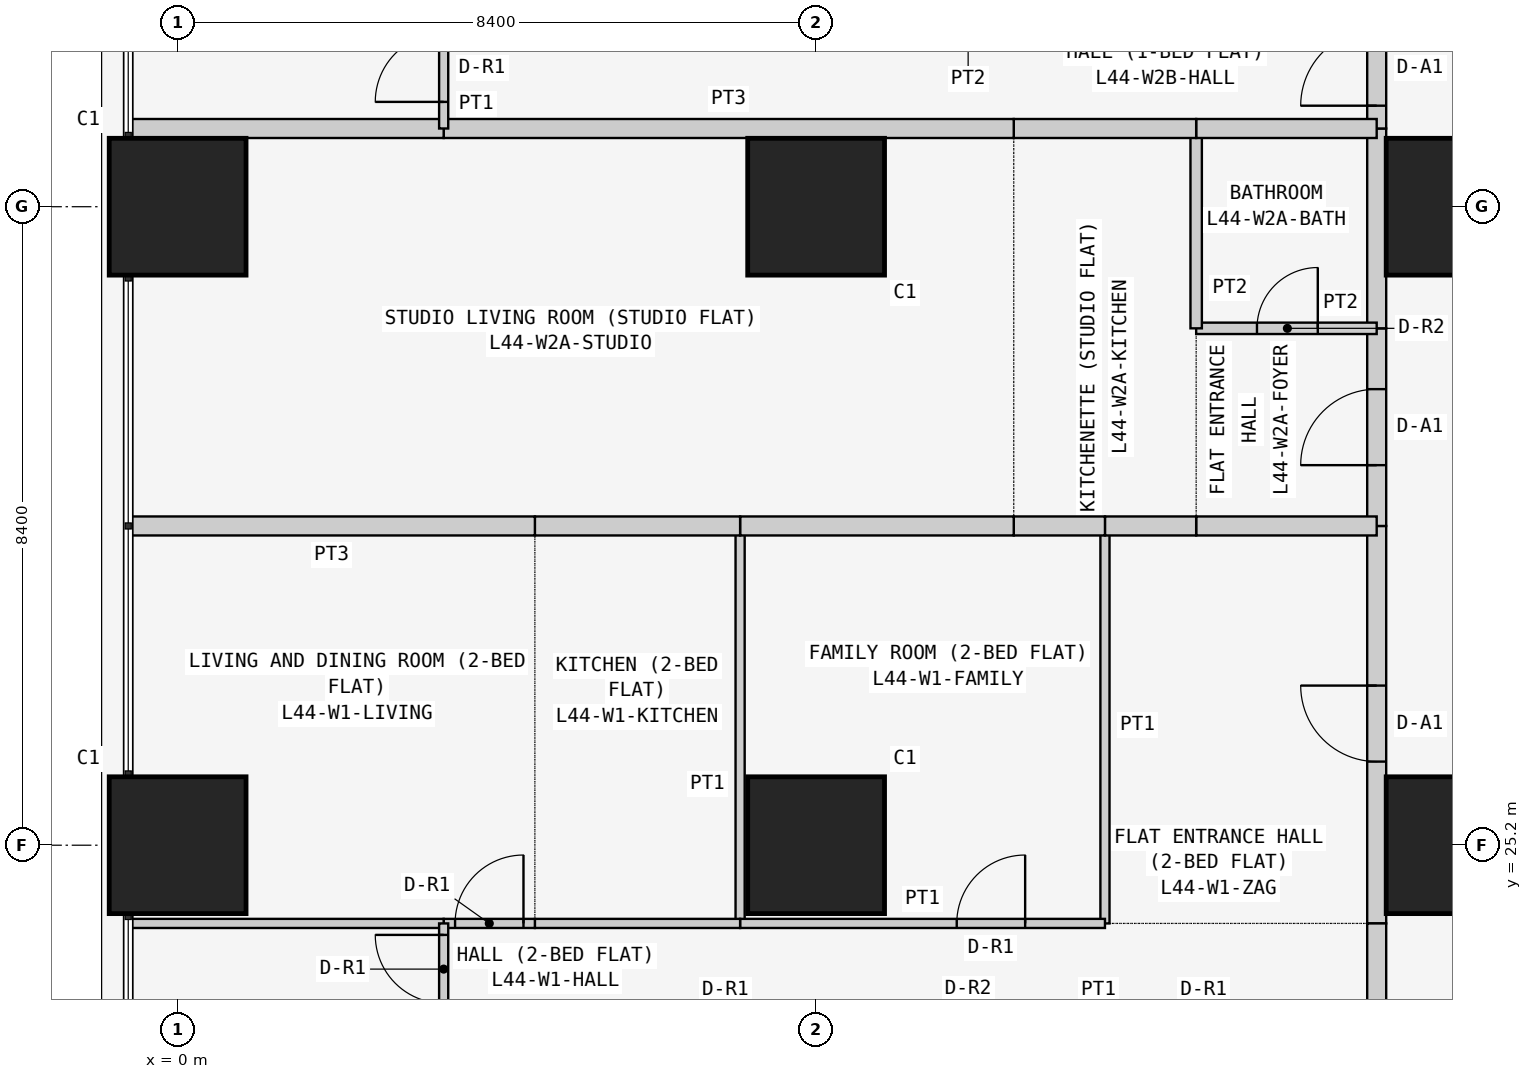
"""IFC4 building model, lengths in metres.
Left out: names, types, materials, properties, quantities, classifications, styles, units other than length and angle.
Written with IfcOpenShell. Run it as: python <this file> out.ifc"""

import sys

from ifc_helpers import new_model, si_unit, direction, frame, frame_2d, origin, origin_2d, place, context, subcontext, project, spatial, rectangle, extrude, element, fill, save


model = new_model("IFC4")
c1 = context("Model", 3, precision=1e-05, world=origin(), true_north=direction((0.0, 1.0)))
c2 = subcontext(c1, "Body", "Model", "MODEL_VIEW")
j1 = project(units=[si_unit("LENGTHUNIT", "METRE"), si_unit("PLANEANGLEUNIT", "RADIAN")], contexts=[c1])
p1 = place(None, origin())
s1 = spatial("IfcSite", under=j1, at=p1, CompositionType="ELEMENT")
p2 = place(p1, origin())
s2 = spatial("IfcBuilding", under=s1, at=p2, CompositionType="ELEMENT")
p3 = place(p2, frame((0.0, 0.0, 170.1)))
s3 = spatial("IfcBuildingStorey", under=s2, at=p3, CompositionType="ELEMENT", Elevation=170.1)
for number, where, z_axis, x_axis in (
    (1, (0.0, 25.2, 0.0), (0.0, 0.0, 1.0), (1.0, 0.0, 0.0)),
    (2, (0.0, 33.6, 0.0), (0.0, 0.0, 1.0), (1.0, 0.0, 0.0)),
    (3, (8.4, 25.2, 0.0), (0.0, 0.0, 1.0), (1.0, 0.0, 0.0)),
    (4, (8.4, 33.6, 0.0), (0.0, 0.0, 1.0), (1.0, 0.0, 0.0)),
    (5, (16.8, 25.2, 0.0), (0.0, 0.0, 1.0), (1.0, 0.0, 0.0)),
    (6, (16.8, 33.6, 0.0), (0.0, 0.0, 1.0), (1.0, 0.0, 0.0)),
):
    element("IfcColumn", number, at=place(p3, frame(where, z_axis=z_axis, x_axis=x_axis)), inside=s3, PredefinedType="COLUMN", context=c2, shape_type="SweptSolid", body=[
        extrude(rectangle(XDim=1.8, YDim=1.8, at=origin_2d()), origin(), (0.0, 0.0, 1.0), 3.6),
    ])
p4 = place(p3, frame((15.775, 24.171, 0.0), z_axis=(0.0, 0.0, 1.0), x_axis=(0.0, 1.0, 0.0)))
e7 = element("IfcWall", 7, at=p4, inside=s3, PredefinedType="PARTITIONING", context=c2, shape_type="SweptSolid", body=[
    extrude(rectangle(XDim=5.229, YDim=0.25, at=frame_2d((2.615, 0.0))), origin(), (0.0, 0.0, 1.0), 3.45),
])
p5 = place(p4, frame((2.129, 0.0, 0.0)))
e8 = element("IfcOpeningElement", 8, at=p5, cuts=e7, PredefinedType="OPENING", context=c2, shape_type="SweptSolid", body=[
    extrude(rectangle(XDim=1.0, YDim=2.1, at=frame_2d((0.5, 1.05))), frame((0.0, 0.135, 0.0), z_axis=(0.0, -1.0, 0.0), x_axis=(1.0, 0.0, 0.0)), (0.0, 0.0, 1.0), 0.27),
])
p6 = place(p3, frame((15.775, 22.971, 0.0), z_axis=(0.0, 0.0, 1.0), x_axis=(0.0, 1.0, 0.0)))
e9 = element("IfcWall", 9, at=p6, inside=s3, PredefinedType="PARTITIONING", context=c2, shape_type="SweptSolid", body=[
    extrude(rectangle(XDim=1.2, YDim=0.25, at=frame_2d((0.6, 0.0))), origin(), (0.0, 0.0, 1.0), 3.45),
])
p7 = place(p3, frame((15.775, 29.4, 0.0), z_axis=(0.0, 0.0, 1.0), x_axis=(0.0, 1.0, 0.0)))
e10 = element("IfcWall", 10, at=p7, inside=s3, PredefinedType="PARTITIONING", context=c2, shape_type="SweptSolid", body=[
    extrude(rectangle(XDim=2.6, YDim=0.25, at=frame_2d((1.3, 0.0))), origin(), (0.0, 0.0, 1.0), 3.45),
])
p8 = place(p7, frame((0.8, 0.0, 0.0)))
e11 = element("IfcOpeningElement", 11, at=p8, cuts=e10, PredefinedType="OPENING", context=c2, shape_type="SweptSolid", body=[
    extrude(rectangle(XDim=1.0, YDim=2.1, at=frame_2d((0.5, 1.05))), frame((0.0, 0.135, 0.0), z_axis=(0.0, -1.0, 0.0), x_axis=(1.0, 0.0, 0.0)), (0.0, 0.0, 1.0), 0.27),
])
p9 = place(p3, frame((15.775, 32.0, 0.0), z_axis=(0.0, 0.0, 1.0), x_axis=(0.0, 1.0, 0.0)))
e12 = element("IfcWall", 12, at=p9, inside=s3, PredefinedType="PARTITIONING", context=c2, shape_type="SweptSolid", body=[
    extrude(rectangle(XDim=2.629, YDim=0.25, at=frame_2d((1.314, 0.0))), origin(), (0.0, 0.0, 1.0), 3.45),
])
p10 = place(p3, frame((15.775, 34.629, 0.0), z_axis=(0.0, 0.0, 1.0), x_axis=(0.0, 1.0, 0.0)))
e13 = element("IfcWall", 13, at=p10, inside=s3, PredefinedType="PARTITIONING", context=c2, shape_type="SweptSolid", body=[
    extrude(rectangle(XDim=1.6, YDim=0.25, at=frame_2d((0.8, 0.0))), origin(), (0.0, 0.0, 1.0), 3.45),
])
p11 = place(p10, frame((0.3, 0.0, 0.0)))
e14 = element("IfcOpeningElement", 14, at=p11, cuts=e13, PredefinedType="OPENING", context=c2, shape_type="SweptSolid", body=[
    extrude(rectangle(XDim=1.0, YDim=2.1, at=frame_2d((0.5, 1.05))), frame((0.0, 0.135, 0.0), z_axis=(0.0, -1.0, 0.0), x_axis=(1.0, 0.0, 0.0)), (0.0, 0.0, 1.0), 0.27),
])
p12 = place(p3, frame((12.2, 29.4, 0.0), z_axis=(0.0, 0.0, 1.0), x_axis=(0.0, -1.0, 0.0)))
e15 = element("IfcWall", 15, at=p12, inside=s3, PredefinedType="PARTITIONING", context=c2, shape_type="SweptSolid", body=[
    extrude(rectangle(XDim=5.229, YDim=0.12, at=frame_2d((2.615, 0.0))), origin(), (0.0, 0.0, 1.0), 3.45),
])
p13 = place(p3, frame((15.775, 29.4, 0.0), z_axis=(0.0, 0.0, 1.0), x_axis=(-1.0, 0.0, 0.0)))
e16 = element("IfcWall", 16, at=p13, inside=s3, PredefinedType="PARTITIONING", context=c2, shape_type="SweptSolid", body=[
    extrude(rectangle(XDim=2.375, YDim=0.25, at=frame_2d((1.188, 0.0))), origin(), (0.0, 0.0, 1.0), 3.45),
])
p14 = place(p3, frame((13.4, 29.4, 0.0), z_axis=(0.0, 0.0, 1.0), x_axis=(-1.0, 0.0, 0.0)))
e17 = element("IfcWall", 17, at=p14, inside=s3, PredefinedType="PARTITIONING", context=c2, shape_type="SweptSolid", body=[
    extrude(rectangle(XDim=1.2, YDim=0.25, at=frame_2d((0.6, 0.0))), origin(), (0.0, 0.0, 1.0), 3.45),
])
p15 = place(p3, frame((7.4, 29.4, 0.0), z_axis=(0.0, 0.0, 1.0), x_axis=(0.0, -1.0, 0.0)))
e18 = element("IfcWall", 18, at=p15, inside=s3, PredefinedType="PARTITIONING", context=c2, shape_type="SweptSolid", body=[
    extrude(rectangle(XDim=5.229, YDim=0.12, at=frame_2d((2.615, 0.0))), origin(), (0.0, 0.0, 1.0), 3.45),
])
p16 = place(p3, frame((7.4, 24.171, 0.0), z_axis=(0.0, 0.0, 1.0), x_axis=(1.0, 0.0, 0.0)))
e19 = element("IfcWall", 19, at=p16, inside=s3, PredefinedType="PARTITIONING", context=c2, shape_type="SweptSolid", body=[
    extrude(rectangle(XDim=4.8, YDim=0.12, at=frame_2d((2.4, 0.0))), origin(), (0.0, 0.0, 1.0), 3.45),
])
p17 = place(p16, frame((2.85, 0.0, 0.0)))
e20 = element("IfcOpeningElement", 20, at=p17, cuts=e19, PredefinedType="OPENING", context=c2, shape_type="SweptSolid", body=[
    extrude(rectangle(XDim=0.9, YDim=2.1, at=frame_2d((0.45, 1.05))), frame((0.0, 0.07, 0.0), z_axis=(0.0, -1.0, 0.0), x_axis=(1.0, 0.0, 0.0)), (0.0, 0.0, 1.0), 0.14),
])
p18 = place(p3, frame((12.2, 29.4, 0.0), z_axis=(0.0, 0.0, 1.0), x_axis=(-1.0, 0.0, 0.0)))
e21 = element("IfcWall", 21, at=p18, inside=s3, PredefinedType="PARTITIONING", context=c2, shape_type="SweptSolid", body=[
    extrude(rectangle(XDim=1.2, YDim=0.25, at=frame_2d((0.6, 0.0))), origin(), (0.0, 0.0, 1.0), 3.45),
])
p19 = place(p3, frame((11.0, 29.4, 0.0), z_axis=(0.0, 0.0, 1.0), x_axis=(-1.0, 0.0, 0.0)))
e22 = element("IfcWall", 22, at=p19, inside=s3, PredefinedType="PARTITIONING", context=c2, shape_type="SweptSolid", body=[
    extrude(rectangle(XDim=3.6, YDim=0.25, at=frame_2d((1.8, 0.0))), origin(), (0.0, 0.0, 1.0), 3.45),
])
p20 = place(p3, frame((4.7, 24.171, 0.0), z_axis=(0.0, 0.0, 1.0), x_axis=(1.0, 0.0, 0.0)))
e23 = element("IfcWall", 23, at=p20, inside=s3, PredefinedType="PARTITIONING", context=c2, shape_type="SweptSolid", body=[
    extrude(rectangle(XDim=2.7, YDim=0.12, at=frame_2d((1.35, 0.0))), origin(), (0.0, 0.0, 1.0), 3.45),
])
p21 = place(p3, frame((7.4, 29.4, 0.0), z_axis=(0.0, 0.0, 1.0), x_axis=(-1.0, 0.0, 0.0)))
e24 = element("IfcWall", 24, at=p21, inside=s3, PredefinedType="PARTITIONING", context=c2, shape_type="SweptSolid", body=[
    extrude(rectangle(XDim=2.7, YDim=0.25, at=frame_2d((1.35, 0.0))), origin(), (0.0, 0.0, 1.0), 3.45),
])
p22 = place(p3, frame((3.5, 24.171, 0.0), z_axis=(0.0, 0.0, 1.0), x_axis=(1.0, 0.0, 0.0)))
e25 = element("IfcWall", 25, at=p22, inside=s3, PredefinedType="PARTITIONING", context=c2, shape_type="SweptSolid", body=[
    extrude(rectangle(XDim=1.2, YDim=0.12, at=frame_2d((0.6, 0.0))), origin(), (0.0, 0.0, 1.0), 3.45),
])
p23 = place(p22, frame((0.15, 0.0, 0.0)))
e26 = element("IfcOpeningElement", 26, at=p23, cuts=e25, PredefinedType="OPENING", context=c2, shape_type="SweptSolid", body=[
    extrude(rectangle(XDim=0.9, YDim=2.1, at=frame_2d((0.45, 1.05))), frame((0.0, 0.07, 0.0), z_axis=(0.0, -1.0, 0.0), x_axis=(1.0, 0.0, 0.0)), (0.0, 0.0, 1.0), 0.14),
])
p24 = place(p3, frame((-0.65, 24.171, 0.0), z_axis=(0.0, 0.0, 1.0), x_axis=(1.0, 0.0, 0.0)))
e27 = element("IfcWall", 27, at=p24, inside=s3, PredefinedType="PARTITIONING", context=c2, shape_type="SweptSolid", body=[
    extrude(rectangle(XDim=4.15, YDim=0.12, at=frame_2d((2.075, 0.0))), origin(), (0.0, 0.0, 1.0), 3.45),
])
p25 = place(p3, frame((4.7, 29.4, 0.0), z_axis=(0.0, 0.0, 1.0), x_axis=(-1.0, 0.0, 0.0)))
e28 = element("IfcWall", 28, at=p25, inside=s3, PredefinedType="PARTITIONING", context=c2, shape_type="SweptSolid", body=[
    extrude(rectangle(XDim=5.35, YDim=0.25, at=frame_2d((2.675, 0.0))), origin(), (0.0, 0.0, 1.0), 3.45),
])
p26 = place(p3, frame((3.5, 24.171, 0.0), z_axis=(0.0, 0.0, 1.0), x_axis=(0.0, -1.0, 0.0)))
e29 = element("IfcWall", 29, at=p26, inside=s3, PredefinedType="PARTITIONING", context=c2, shape_type="SweptSolid", body=[
    extrude(rectangle(XDim=1.2, YDim=0.12, at=frame_2d((0.6, 0.0))), origin(), (0.0, 0.0, 1.0), 3.45),
])
p27 = place(p26, frame((0.151, 0.0, 0.0)))
e30 = element("IfcOpeningElement", 30, at=p27, cuts=e29, PredefinedType="OPENING", context=c2, shape_type="SweptSolid", body=[
    extrude(rectangle(XDim=0.9, YDim=2.1, at=frame_2d((0.45, 1.05))), frame((0.0, 0.07, 0.0), z_axis=(0.0, -1.0, 0.0), x_axis=(1.0, 0.0, 0.0)), (0.0, 0.0, 1.0), 0.14),
])
p28 = place(p3, frame((13.4, 32.0, 0.0), z_axis=(0.0, 0.0, 1.0), x_axis=(1.0, 0.0, 0.0)))
e31 = element("IfcWall", 31, at=p28, inside=s3, PredefinedType="PARTITIONING", context=c2, shape_type="SweptSolid", body=[
    extrude(rectangle(XDim=2.375, YDim=0.15, at=frame_2d((1.188, 0.0))), origin(), (0.0, 0.0, 1.0), 3.45),
])
p29 = place(p28, frame((0.8, 0.0, 0.0)))
e32 = element("IfcOpeningElement", 32, at=p29, cuts=e31, PredefinedType="OPENING", context=c2, shape_type="SweptSolid", body=[
    extrude(rectangle(XDim=0.8, YDim=2.1, at=frame_2d((0.4, 1.05))), frame((0.0, 0.085, 0.0), z_axis=(0.0, -1.0, 0.0), x_axis=(1.0, 0.0, 0.0)), (0.0, 0.0, 1.0), 0.17),
])
p30 = place(p3, frame((13.4, 32.0, 0.0), z_axis=(0.0, 0.0, 1.0), x_axis=(0.0, 1.0, 0.0)))
e33 = element("IfcWall", 33, at=p30, inside=s3, PredefinedType="PARTITIONING", context=c2, shape_type="SweptSolid", body=[
    extrude(rectangle(XDim=2.629, YDim=0.15, at=frame_2d((1.314, 0.0))), origin(), (0.0, 0.0, 1.0), 3.45),
])
p31 = place(p3, frame((13.4, 34.629, 0.0), z_axis=(0.0, 0.0, 1.0), x_axis=(1.0, 0.0, 0.0)))
e34 = element("IfcWall", 34, at=p31, inside=s3, PredefinedType="PARTITIONING", context=c2, shape_type="SweptSolid", body=[
    extrude(rectangle(XDim=2.375, YDim=0.25, at=frame_2d((1.188, 0.0))), origin(), (0.0, 0.0, 1.0), 3.45),
])
p32 = place(p3, frame((11.0, 34.629, 0.0), z_axis=(0.0, 0.0, 1.0), x_axis=(1.0, 0.0, 0.0)))
e35 = element("IfcWall", 35, at=p32, inside=s3, PredefinedType="PARTITIONING", context=c2, shape_type="SweptSolid", body=[
    extrude(rectangle(XDim=2.4, YDim=0.25, at=frame_2d((1.2, 0.0))), origin(), (0.0, 0.0, 1.0), 3.45),
])
p33 = place(p3, frame((3.5, 34.629, 0.0), z_axis=(0.0, 0.0, 1.0), x_axis=(1.0, 0.0, 0.0)))
e36 = element("IfcWall", 36, at=p33, inside=s3, PredefinedType="PARTITIONING", context=c2, shape_type="SweptSolid", body=[
    extrude(rectangle(XDim=7.5, YDim=0.25, at=frame_2d((3.75, 0.0))), origin(), (0.0, 0.0, 1.0), 3.45),
])
p34 = place(p3, frame((-0.65, 34.629, 0.0), z_axis=(0.0, 0.0, 1.0), x_axis=(1.0, 0.0, 0.0)))
e37 = element("IfcWall", 37, at=p34, inside=s3, PredefinedType="PARTITIONING", context=c2, shape_type="SweptSolid", body=[
    extrude(rectangle(XDim=4.15, YDim=0.25, at=frame_2d((2.075, 0.0))), origin(), (0.0, 0.0, 1.0), 3.45),
])
p35 = place(p3, frame((3.5, 34.629, 0.0), z_axis=(0.0, 0.0, 1.0), x_axis=(0.0, 1.0, 0.0)))
e38 = element("IfcWall", 38, at=p35, inside=s3, PredefinedType="PARTITIONING", context=c2, shape_type="SweptSolid", body=[
    extrude(rectangle(XDim=1.6, YDim=0.12, at=frame_2d((0.8, 0.0))), origin(), (0.0, 0.0, 1.0), 3.45),
])
p36 = place(p35, frame((0.35, 0.0, 0.0)))
e39 = element("IfcOpeningElement", 39, at=p36, cuts=e38, PredefinedType="OPENING", context=c2, shape_type="SweptSolid", body=[
    extrude(rectangle(XDim=0.9, YDim=2.1, at=frame_2d((0.45, 1.05))), frame((0.0, 0.07, 0.0), z_axis=(0.0, -1.0, 0.0), x_axis=(1.0, 0.0, 0.0)), (0.0, 0.0, 1.0), 0.14),
])
p37 = place(p5, origin())
e40 = element("IfcDoor", 40, at=p37, inside=s3, OperationType="SINGLE_SWING_RIGHT", PredefinedType="DOOR", context=c2, shape_type="SweptSolid", body=[
    extrude(rectangle(XDim=1.0, YDim=2.1, at=frame_2d((0.5, 1.05))), frame((0.0, 0.025, 0.0), z_axis=(0.0, -1.0, 0.0), x_axis=(1.0, 0.0, 0.0)), (0.0, 0.0, 1.0), 0.05),
])
fill(e8, e40)
p38 = place(p17, origin())
e41 = element("IfcDoor", 41, at=p38, inside=s3, OperationType="SINGLE_SWING_RIGHT", PredefinedType="DOOR", context=c2, shape_type="SweptSolid", body=[
    extrude(rectangle(XDim=0.9, YDim=2.1, at=frame_2d((0.45, 1.05))), frame((0.0, 0.025, 0.0), z_axis=(0.0, -1.0, 0.0), x_axis=(1.0, 0.0, 0.0)), (0.0, 0.0, 1.0), 0.05),
])
fill(e20, e41)
p39 = place(p23, origin())
e42 = element("IfcDoor", 42, at=p39, inside=s3, OperationType="SINGLE_SWING_RIGHT", PredefinedType="DOOR", context=c2, shape_type="SweptSolid", body=[
    extrude(rectangle(XDim=0.9, YDim=2.1, at=frame_2d((0.45, 1.05))), frame((0.0, 0.025, 0.0), z_axis=(0.0, -1.0, 0.0), x_axis=(1.0, 0.0, 0.0)), (0.0, 0.0, 1.0), 0.05),
])
fill(e26, e42)
p40 = place(p27, frame((0.9, 0.0, 0.0), z_axis=(0.0, 0.0, 1.0), x_axis=(-1.0, 0.0, 0.0)))
e43 = element("IfcDoor", 43, at=p40, inside=s3, OperationType="SINGLE_SWING_RIGHT", PredefinedType="DOOR", context=c2, shape_type="SweptSolid", body=[
    extrude(rectangle(XDim=0.9, YDim=2.1, at=frame_2d((0.45, 1.05))), frame((0.0, 0.025, 0.0), z_axis=(0.0, -1.0, 0.0), x_axis=(1.0, 0.0, 0.0)), (0.0, 0.0, 1.0), 0.05),
])
fill(e30, e43)
p41 = place(p8, origin())
e44 = element("IfcDoor", 44, at=p41, inside=s3, OperationType="SINGLE_SWING_LEFT", PredefinedType="DOOR", context=c2, shape_type="SweptSolid", body=[
    extrude(rectangle(XDim=1.0, YDim=2.1, at=frame_2d((0.5, 1.05))), frame((0.0, 0.025, 0.0), z_axis=(0.0, -1.0, 0.0), x_axis=(1.0, 0.0, 0.0)), (0.0, 0.0, 1.0), 0.05),
])
fill(e11, e44)
p42 = place(p29, origin())
e45 = element("IfcDoor", 45, at=p42, inside=s3, OperationType="SINGLE_SWING_RIGHT", PredefinedType="DOOR", context=c2, shape_type="SweptSolid", body=[
    extrude(rectangle(XDim=0.8, YDim=2.1, at=frame_2d((0.4, 1.05))), frame((0.0, 0.025, 0.0), z_axis=(0.0, -1.0, 0.0), x_axis=(1.0, 0.0, 0.0)), (0.0, 0.0, 1.0), 0.05),
])
fill(e32, e45)
p43 = place(p11, origin())
e46 = element("IfcDoor", 46, at=p43, inside=s3, OperationType="SINGLE_SWING_LEFT", PredefinedType="DOOR", context=c2, shape_type="SweptSolid", body=[
    extrude(rectangle(XDim=1.0, YDim=2.1, at=frame_2d((0.5, 1.05))), frame((0.0, 0.025, 0.0), z_axis=(0.0, -1.0, 0.0), x_axis=(1.0, 0.0, 0.0)), (0.0, 0.0, 1.0), 0.05),
])
fill(e14, e46)
p44 = place(p36, origin())
e47 = element("IfcDoor", 47, at=p44, inside=s3, OperationType="SINGLE_SWING_LEFT", PredefinedType="DOOR", context=c2, shape_type="SweptSolid", body=[
    extrude(rectangle(XDim=0.9, YDim=2.1, at=frame_2d((0.45, 1.05))), frame((0.0, 0.025, 0.0), z_axis=(0.0, -1.0, 0.0), x_axis=(1.0, 0.0, 0.0)), (0.0, 0.0, 1.0), 0.05),
])
fill(e39, e47)
save(model, sys.argv[1])
